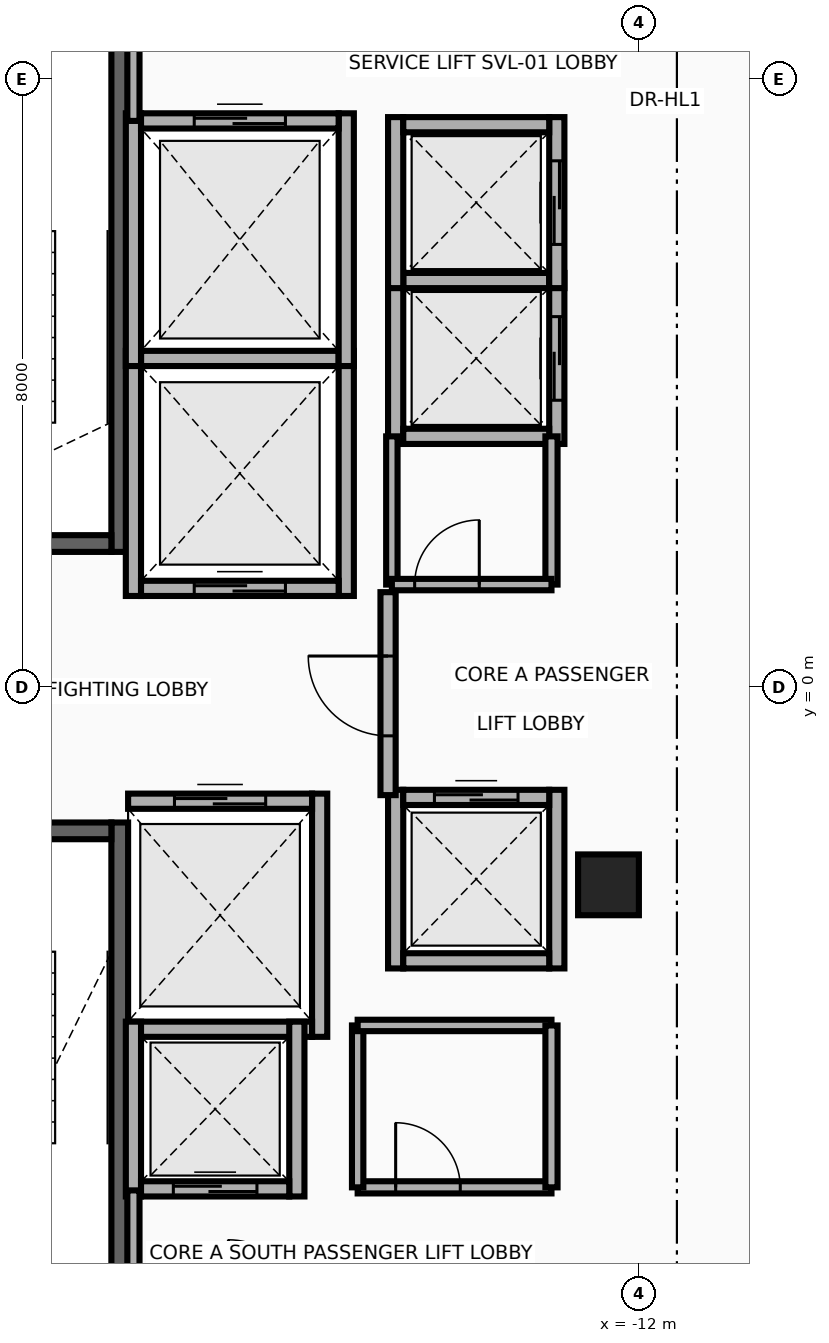
"""IFC4 building model, lengths in metres.
Left out: names, types, materials, properties, quantities, classifications, styles, units other than length and angle.
Written with IfcOpenShell. Run it as: python <this file> out.ifc"""

import sys

from ifc_helpers import new_model, si_unit, direction, frame, frame_2d, origin, origin_2d, place, context, subcontext, project, spatial, rectangle, extrude, source, transform, mapped, element, fill, save


model = new_model("IFC4")
c1 = context("Model", 3, precision=1e-05, world=origin(), true_north=direction((0.0, 1.0)))
c2 = subcontext(c1, "Body", "Model", "MODEL_VIEW")
j1 = project(units=[si_unit("LENGTHUNIT", "METRE"), si_unit("PLANEANGLEUNIT", "RADIAN")], contexts=[c1])
p1 = place(None, origin())
s1 = spatial("IfcSite", under=j1, at=p1, CompositionType="ELEMENT")
p2 = place(p1, origin())
s2 = spatial("IfcBuilding", under=s1, at=p2, CompositionType="ELEMENT")
p3 = place(p2, frame((0.0, 0.0, 276.5)))
s3 = spatial("IfcBuildingStorey", under=s2, at=p3, CompositionType="ELEMENT", Elevation=276.5)
p4 = place(p3, frame((-18.83, 1.78, 0.0), z_axis=(0.0, 0.0, 1.0), x_axis=(0.0, 1.0, 0.0)))
e1 = element("IfcWall", 1, at=p4, inside=s3, PredefinedType="SHEAR", context=c2, shape_type="SweptSolid", body=[
    extrude(rectangle(XDim=8.745, YDim=0.22, at=frame_2d((4.373, 0.0))), origin(), (0.0, 0.0, 1.0), 3.26),
])
p5 = place(p3, frame((-22.05, 1.89, 0.0), z_axis=(0.0, 0.0, 1.0), x_axis=(1.0, 0.0, 0.0)))
e2 = element("IfcWall", 2, at=p5, inside=s3, PredefinedType="SHEAR", context=c2, shape_type="SweptSolid", body=[
    extrude(rectangle(XDim=3.11, YDim=0.22, at=frame_2d((1.555, 0.0))), origin(), (0.0, 0.0, 1.0), 3.26),
])
p6 = place(p5, frame((1.0, 0.0, 0.0)))
e3 = element("IfcOpeningElement", 3, at=p6, cuts=e2, PredefinedType="OPENING", context=c2, shape_type="SweptSolid", body=[
    extrude(rectangle(XDim=1.1, YDim=2.15, at=frame_2d((0.55, 1.075))), frame((0.0, 0.125, 0.0), z_axis=(0.0, -1.0, 0.0), x_axis=(1.0, 0.0, 0.0)), (0.0, 0.0, 1.0), 0.25),
])
p7 = place(p3, frame((-18.83, -10.525, 0.0), z_axis=(0.0, 0.0, 1.0), x_axis=(0.0, 1.0, 0.0)))
e4 = element("IfcWall", 4, at=p7, inside=s3, PredefinedType="SHEAR", context=c2, shape_type="SweptSolid", body=[
    extrude(rectangle(XDim=8.745, YDim=0.22, at=frame_2d((4.373, 0.0))), origin(), (0.0, 0.0, 1.0), 3.26),
])
p8 = place(p3, frame((-22.05, -1.89, 0.0), z_axis=(0.0, 0.0, 1.0), x_axis=(1.0, 0.0, 0.0)))
e5 = element("IfcWall", 5, at=p8, inside=s3, PredefinedType="SHEAR", context=c2, shape_type="SweptSolid", body=[
    extrude(rectangle(XDim=3.11, YDim=0.22, at=frame_2d((1.555, 0.0))), origin(), (0.0, 0.0, 1.0), 3.26),
])
p9 = place(p8, frame((1.0, 0.0, 0.0)))
e6 = element("IfcOpeningElement", 6, at=p9, cuts=e5, PredefinedType="OPENING", context=c2, shape_type="SweptSolid", body=[
    extrude(rectangle(XDim=1.1, YDim=2.15, at=frame_2d((0.55, 1.075))), frame((0.0, 0.125, 0.0), z_axis=(0.0, -1.0, 0.0), x_axis=(1.0, 0.0, 0.0)), (0.0, 0.0, 1.0), 0.25),
])
m1 = source(origin(), c2, "Body", "SweptSolid", [
    extrude(rectangle(XDim=0.8, YDim=0.8, at=origin_2d()), origin(), (0.0, 0.0, 1.0), 3.5),
])
p10 = place(p3, frame((-12.4, -2.6, 0.0), z_axis=(0.0, 0.0, 1.0), x_axis=(1.0, 0.0, 0.0)))
e7 = element("IfcColumn", 7, at=p10, inside=s3, PredefinedType="COLUMN", context=c2, shape_type="MappedRepresentation", body=[
    mapped(m1, transform((0.0, 0.0, 0.0), x_axis=(1.0, 0.0, 0.0), y_axis=(0.0, 1.0, 0.0), z_axis=(0.0, 0.0, 1.0), scale=1.0)),
])
for number, where, z_axis, x_axis in (
    (8, (-18.65, 1.2, 0.0), (0.0, 0.0, 1.0), (0.0, 1.0, 0.0)),
    (9, (-15.85, 1.2, 0.0), (0.0, 0.0, 1.0), (0.0, 1.0, 0.0)),
):
    element("IfcWall", number, at=place(p3, frame(where, z_axis=z_axis, x_axis=x_axis)), inside=s3, PredefinedType="MOVABLE", context=c2, shape_type="SweptSolid", body=[
        extrude(rectangle(XDim=3.225, YDim=0.2, at=frame_2d((1.613, 0.0))), origin(), (0.0, 0.0, 1.0), 3.26),
    ])
p11 = place(p3, frame((-18.55, 1.3, 0.0), z_axis=(0.0, 0.0, 1.0), x_axis=(1.0, 0.0, 0.0)))
e10 = element("IfcWall", 10, at=p11, inside=s3, PredefinedType="MOVABLE", context=c2, shape_type="SweptSolid", body=[
    extrude(rectangle(XDim=2.6, YDim=0.2, at=frame_2d((1.3, 0.0))), origin(), (0.0, 0.0, 1.0), 3.26),
])
p12 = place(p11, frame((0.7, 0.0, 0.0)))
e11 = element("IfcOpeningElement", 11, at=p12, cuts=e10, PredefinedType="OPENING", context=c2, shape_type="SweptSolid", body=[
    extrude(rectangle(XDim=1.2, YDim=2.1, at=frame_2d((0.6, 1.05))), frame((0.0, 0.115, 0.0), z_axis=(0.0, -1.0, 0.0), x_axis=(1.0, 0.0, 0.0)), (0.0, 0.0, 1.0), 0.23),
])
p13 = place(p3, frame((-18.55, 4.325, 0.0), z_axis=(0.0, 0.0, 1.0), x_axis=(1.0, 0.0, 0.0)))
e12 = element("IfcWall", 12, at=p13, inside=s3, PredefinedType="MOVABLE", context=c2, shape_type="SweptSolid", body=[
    extrude(rectangle(XDim=2.6, YDim=0.2, at=frame_2d((1.3, 0.0))), origin(), (0.0, 0.0, 1.0), 3.26),
])
p14 = place(p3, frame((-16.2, -4.6, 0.0), z_axis=(0.0, 0.0, 1.0), x_axis=(0.0, 1.0, 0.0)))
e13 = element("IfcWall", 13, at=p14, inside=s3, PredefinedType="MOVABLE", context=c2, shape_type="SweptSolid", body=[
    extrude(rectangle(XDim=3.2, YDim=0.2, at=frame_2d((1.6, 0.0))), origin(), (0.0, 0.0, 1.0), 3.26),
])
p15 = place(p3, frame((-18.72, -4.5, 0.0), z_axis=(0.0, 0.0, 1.0), x_axis=(1.0, 0.0, 0.0)))
e14 = element("IfcWall", 14, at=p15, inside=s3, PredefinedType="MOVABLE", context=c2, shape_type="SweptSolid", body=[
    extrude(rectangle(XDim=2.42, YDim=0.2, at=frame_2d((1.21, 0.0))), origin(), (0.0, 0.0, 1.0), 3.26),
])
p16 = place(p3, frame((-18.72, -1.5, 0.0), z_axis=(0.0, 0.0, 1.0), x_axis=(1.0, 0.0, 0.0)))
e15 = element("IfcWall", 15, at=p16, inside=s3, PredefinedType="MOVABLE", context=c2, shape_type="SweptSolid", body=[
    extrude(rectangle(XDim=2.42, YDim=0.2, at=frame_2d((1.21, 0.0))), origin(), (0.0, 0.0, 1.0), 3.26),
])
p17 = place(p16, frame((0.61, 0.0, 0.0)))
e16 = element("IfcOpeningElement", 16, at=p17, cuts=e15, PredefinedType="OPENING", context=c2, shape_type="SweptSolid", body=[
    extrude(rectangle(XDim=1.2, YDim=2.1, at=frame_2d((0.6, 1.05))), frame((0.0, 0.115, 0.0), z_axis=(0.0, -1.0, 0.0), x_axis=(1.0, 0.0, 0.0)), (0.0, 0.0, 1.0), 0.23),
])
for number, where, z_axis, x_axis in (
    (17, (-18.65, 4.225, 0.0), (0.0, 0.0, 1.0), (0.0, 1.0, 0.0)),
    (18, (-15.85, 4.225, 0.0), (0.0, 0.0, 1.0), (0.0, 1.0, 0.0)),
):
    element("IfcWall", number, at=place(p3, frame(where, z_axis=z_axis, x_axis=x_axis)), inside=s3, PredefinedType="MOVABLE", context=c2, shape_type="SweptSolid", body=[
        extrude(rectangle(XDim=3.325, YDim=0.2, at=frame_2d((1.663, 0.0))), origin(), (0.0, 0.0, 1.0), 3.26),
    ])
p18 = place(p3, frame((-18.55, 7.45, 0.0), z_axis=(0.0, 0.0, 1.0), x_axis=(1.0, 0.0, 0.0)))
e19 = element("IfcWall", 19, at=p18, inside=s3, PredefinedType="MOVABLE", context=c2, shape_type="SweptSolid", body=[
    extrude(rectangle(XDim=2.6, YDim=0.2, at=frame_2d((1.3, 0.0))), origin(), (0.0, 0.0, 1.0), 3.26),
])
p19 = place(p18, frame((0.7, 0.0, 0.0)))
e20 = element("IfcOpeningElement", 20, at=p19, cuts=e19, PredefinedType="OPENING", context=c2, shape_type="SweptSolid", body=[
    extrude(rectangle(XDim=1.2, YDim=2.1, at=frame_2d((0.6, 1.05))), frame((0.0, 0.115, 0.0), z_axis=(0.0, -1.0, 0.0), x_axis=(1.0, 0.0, 0.0)), (0.0, 0.0, 1.0), 0.23),
])
p20 = place(p3, frame((-15.2, 3.2, 0.0), z_axis=(0.0, 0.0, 1.0), x_axis=(0.0, 1.0, 0.0)))
e21 = element("IfcWall", 21, at=p20, inside=s3, PredefinedType="MOVABLE", context=c2, shape_type="SweptSolid", body=[
    extrude(rectangle(XDim=2.25, YDim=0.2, at=frame_2d((1.125, 0.0))), origin(), (0.0, 0.0, 1.0), 3.26),
])
p21 = place(p3, frame((-13.08, 3.2, 0.0), z_axis=(0.0, 0.0, 1.0), x_axis=(0.0, 1.0, 0.0)))
e22 = element("IfcWall", 22, at=p21, inside=s3, PredefinedType="MOVABLE", context=c2, shape_type="SweptSolid", body=[
    extrude(rectangle(XDim=2.25, YDim=0.2, at=frame_2d((1.125, 0.0))), origin(), (0.0, 0.0, 1.0), 3.26),
])
p22 = place(p21, frame((0.575, 0.0, 0.0)))
e23 = element("IfcOpeningElement", 23, at=p22, cuts=e22, PredefinedType="OPENING", context=c2, shape_type="SweptSolid", body=[
    extrude(rectangle(XDim=1.1, YDim=2.1, at=frame_2d((0.55, 1.05))), frame((0.0, 0.115, 0.0), z_axis=(0.0, -1.0, 0.0), x_axis=(1.0, 0.0, 0.0)), (0.0, 0.0, 1.0), 0.23),
])
for number, where, z_axis, x_axis in (
    (24, (-15.1, 3.3, 0.0), (0.0, 0.0, 1.0), (1.0, 0.0, 0.0)),
    (25, (-15.1, 5.35, 0.0), (0.0, 0.0, 1.0), (1.0, 0.0, 0.0)),
):
    element("IfcWall", number, at=place(p3, frame(where, z_axis=z_axis, x_axis=x_axis)), inside=s3, PredefinedType="MOVABLE", context=c2, shape_type="SweptSolid", body=[
        extrude(rectangle(XDim=1.92, YDim=0.2, at=frame_2d((0.96, 0.0))), origin(), (0.0, 0.0, 1.0), 3.26),
    ])
p23 = place(p3, frame((-15.2, 5.25, 0.0), z_axis=(0.0, 0.0, 1.0), x_axis=(0.0, 1.0, 0.0)))
e26 = element("IfcWall", 26, at=p23, inside=s3, PredefinedType="MOVABLE", context=c2, shape_type="SweptSolid", body=[
    extrude(rectangle(XDim=2.25, YDim=0.2, at=frame_2d((1.125, 0.0))), origin(), (0.0, 0.0, 1.0), 3.26),
])
p24 = place(p3, frame((-13.08, 5.25, 0.0), z_axis=(0.0, 0.0, 1.0), x_axis=(0.0, 1.0, 0.0)))
e27 = element("IfcWall", 27, at=p24, inside=s3, PredefinedType="MOVABLE", context=c2, shape_type="SweptSolid", body=[
    extrude(rectangle(XDim=2.25, YDim=0.2, at=frame_2d((1.125, 0.0))), origin(), (0.0, 0.0, 1.0), 3.26),
])
p25 = place(p24, frame((0.575, 0.0, 0.0)))
e28 = element("IfcOpeningElement", 28, at=p25, cuts=e27, PredefinedType="OPENING", context=c2, shape_type="SweptSolid", body=[
    extrude(rectangle(XDim=1.1, YDim=2.1, at=frame_2d((0.55, 1.05))), frame((0.0, 0.115, 0.0), z_axis=(0.0, -1.0, 0.0), x_axis=(1.0, 0.0, 0.0)), (0.0, 0.0, 1.0), 0.23),
])
p26 = place(p3, frame((-15.1, 7.4, 0.0), z_axis=(0.0, 0.0, 1.0), x_axis=(1.0, 0.0, 0.0)))
e29 = element("IfcWall", 29, at=p26, inside=s3, PredefinedType="MOVABLE", context=c2, shape_type="SweptSolid", body=[
    extrude(rectangle(XDim=1.92, YDim=0.2, at=frame_2d((0.96, 0.0))), origin(), (0.0, 0.0, 1.0), 3.26),
])
for number, where, z_axis, x_axis in (
    (30, (-18.65, -6.7, 0.0), (0.0, 0.0, 1.0), (0.0, 1.0, 0.0)),
    (31, (-16.5, -6.7, 0.0), (0.0, 0.0, 1.0), (0.0, 1.0, 0.0)),
):
    element("IfcWall", number, at=place(p3, frame(where, z_axis=z_axis, x_axis=x_axis)), inside=s3, PredefinedType="MOVABLE", context=c2, shape_type="SweptSolid", body=[
        extrude(rectangle(XDim=2.3, YDim=0.2, at=frame_2d((1.15, 0.0))), origin(), (0.0, 0.0, 1.0), 3.26),
    ])
p27 = place(p3, frame((-18.55, -6.6, 0.0), z_axis=(0.0, 0.0, 1.0), x_axis=(1.0, 0.0, 0.0)))
e32 = element("IfcWall", 32, at=p27, inside=s3, PredefinedType="MOVABLE", context=c2, shape_type="SweptSolid", body=[
    extrude(rectangle(XDim=1.95, YDim=0.2, at=frame_2d((0.975, 0.0))), origin(), (0.0, 0.0, 1.0), 3.26),
])
p28 = place(p27, frame((0.425, 0.0, 0.0)))
e33 = element("IfcOpeningElement", 33, at=p28, cuts=e32, PredefinedType="OPENING", context=c2, shape_type="SweptSolid", body=[
    extrude(rectangle(XDim=1.1, YDim=2.1, at=frame_2d((0.55, 1.05))), frame((0.0, 0.115, 0.0), z_axis=(0.0, -1.0, 0.0), x_axis=(1.0, 0.0, 0.0)), (0.0, 0.0, 1.0), 0.23),
])
for number, where, z_axis, x_axis in (
    (34, (-15.2, -3.7, 0.0), (0.0, 0.0, 1.0), (0.0, 1.0, 0.0)),
    (35, (-13.08, -3.7, 0.0), (0.0, 0.0, 1.0), (0.0, 1.0, 0.0)),
):
    element("IfcWall", number, at=place(p3, frame(where, z_axis=z_axis, x_axis=x_axis)), inside=s3, PredefinedType="MOVABLE", context=c2, shape_type="SweptSolid", body=[
        extrude(rectangle(XDim=2.35, YDim=0.2, at=frame_2d((1.175, 0.0))), origin(), (0.0, 0.0, 1.0), 3.26),
    ])
p29 = place(p3, frame((-15.1, -3.6, 0.0), z_axis=(0.0, 0.0, 1.0), x_axis=(1.0, 0.0, 0.0)))
e36 = element("IfcWall", 36, at=p29, inside=s3, PredefinedType="MOVABLE", context=c2, shape_type="SweptSolid", body=[
    extrude(rectangle(XDim=1.92, YDim=0.2, at=frame_2d((0.96, 0.0))), origin(), (0.0, 0.0, 1.0), 3.26),
])
p30 = place(p3, frame((-15.1, -1.45, 0.0), z_axis=(0.0, 0.0, 1.0), x_axis=(1.0, 0.0, 0.0)))
e37 = element("IfcWall", 37, at=p30, inside=s3, PredefinedType="MOVABLE", context=c2, shape_type="SweptSolid", body=[
    extrude(rectangle(XDim=1.92, YDim=0.2, at=frame_2d((0.96, 0.0))), origin(), (0.0, 0.0, 1.0), 3.26),
])
p31 = place(p30, frame((0.41, 0.0, 0.0)))
e38 = element("IfcOpeningElement", 38, at=p31, cuts=e37, PredefinedType="OPENING", context=c2, shape_type="SweptSolid", body=[
    extrude(rectangle(XDim=1.1, YDim=2.1, at=frame_2d((0.55, 1.05))), frame((0.0, 0.115, 0.0), z_axis=(0.0, -1.0, 0.0), x_axis=(1.0, 0.0, 0.0)), (0.0, 0.0, 1.0), 0.23),
])
p32 = place(p3, frame((-15.3, -1.42, 0.0), z_axis=(0.0, 0.0, 1.0), x_axis=(0.0, 1.0, 0.0)))
e39 = element("IfcWall", 39, at=p32, inside=s3, PredefinedType="PARTITIONING", context=c2, shape_type="SweptSolid", body=[
    extrude(rectangle(XDim=2.67, YDim=0.2, at=frame_2d((1.335, 0.0))), origin(), (0.0, 0.0, 1.0), 3.26),
])
p33 = place(p32, frame((0.78, 0.0, 0.0)))
e40 = element("IfcOpeningElement", 40, at=p33, cuts=e39, PredefinedType="OPENING", context=c2, shape_type="SweptSolid", body=[
    extrude(rectangle(XDim=1.05, YDim=2.15, at=frame_2d((0.525, 1.075))), frame((0.0, 0.115, 0.0), z_axis=(0.0, -1.0, 0.0), x_axis=(1.0, 0.0, 0.0)), (0.0, 0.0, 1.0), 0.23),
])
p34 = place(p3, frame((-18.65, 7.45, 0.0), z_axis=(0.0, 0.0, 1.0), x_axis=(0.0, 1.0, 0.0)))
e41 = element("IfcWall", 41, at=p34, inside=s3, PredefinedType="PARTITIONING", context=c2, shape_type="SweptSolid", body=[
    extrude(rectangle(XDim=2.93, YDim=0.16, at=frame_2d((1.465, 0.0))), origin(), (0.0, 0.0, 1.0), 3.26),
])
p35 = place(p3, frame((-18.65, -8.18, 0.0), z_axis=(0.0, 0.0, 1.0), x_axis=(0.0, 1.0, 0.0)))
e42 = element("IfcWall", 42, at=p35, inside=s3, PredefinedType="PARTITIONING", context=c2, shape_type="SweptSolid", body=[
    extrude(rectangle(XDim=1.56, YDim=0.16, at=frame_2d((0.78, 0.0))), origin(), (0.0, 0.0, 1.0), 3.26),
])
p36 = place(p3, frame((-15.7, -6.58, 0.0), z_axis=(0.0, 0.0, 1.0), x_axis=(1.0, 0.0, 0.0)))
e43 = element("IfcWall", 43, at=p36, inside=s3, PredefinedType="PARTITIONING", context=c2, shape_type="SweptSolid", body=[
    extrude(rectangle(XDim=2.55, YDim=0.16, at=frame_2d((1.275, 0.0))), origin(), (0.0, 0.0, 1.0), 3.26),
])
p37 = place(p36, frame((0.5, 0.0, 0.0)))
e44 = element("IfcOpeningElement", 44, at=p37, cuts=e43, PredefinedType="OPENING", context=c2, shape_type="SweptSolid", body=[
    extrude(rectangle(XDim=0.85, YDim=2.05, at=frame_2d((0.425, 1.025))), frame((0.0, 0.095, 0.0), z_axis=(0.0, -1.0, 0.0), x_axis=(1.0, 0.0, 0.0)), (0.0, 0.0, 1.0), 0.19),
])
p38 = place(p3, frame((-15.7, -6.58, 0.0), z_axis=(0.0, 0.0, 1.0), x_axis=(0.0, 1.0, 0.0)))
e45 = element("IfcWall", 45, at=p38, inside=s3, PredefinedType="PARTITIONING", context=c2, shape_type="SweptSolid", body=[
    extrude(rectangle(XDim=2.13, YDim=0.15, at=frame_2d((1.065, 0.0))), origin(), (0.0, 0.0, 1.0), 3.26),
])
p39 = place(p3, frame((-15.7, -4.45, 0.0), z_axis=(0.0, 0.0, 1.0), x_axis=(1.0, 0.0, 0.0)))
e46 = element("IfcWall", 46, at=p39, inside=s3, PredefinedType="PARTITIONING", context=c2, shape_type="SweptSolid", body=[
    extrude(rectangle(XDim=2.55, YDim=0.15, at=frame_2d((1.275, 0.0))), origin(), (0.0, 0.0, 1.0), 3.26),
])
p40 = place(p3, frame((-13.15, -6.58, 0.0), z_axis=(0.0, 0.0, 1.0), x_axis=(0.0, 1.0, 0.0)))
e47 = element("IfcWall", 47, at=p40, inside=s3, PredefinedType="PARTITIONING", context=c2, shape_type="SweptSolid", body=[
    extrude(rectangle(XDim=2.13, YDim=0.16, at=frame_2d((1.065, 0.0))), origin(), (0.0, 0.0, 1.0), 3.26),
])
p41 = place(p3, frame((-13.15, 1.35, 0.0), z_axis=(0.0, 0.0, 1.0), x_axis=(0.0, 1.0, 0.0)))
e48 = element("IfcWall", 48, at=p41, inside=s3, PredefinedType="PARTITIONING", context=c2, shape_type="SweptSolid", body=[
    extrude(rectangle(XDim=1.95, YDim=0.16, at=frame_2d((0.975, 0.0))), origin(), (0.0, 0.0, 1.0), 3.26),
])
p42 = place(p3, frame((-15.25, 1.35, 0.0), z_axis=(0.0, 0.0, 1.0), x_axis=(0.0, 1.0, 0.0)))
e49 = element("IfcWall", 49, at=p42, inside=s3, PredefinedType="PARTITIONING", context=c2, shape_type="SweptSolid", body=[
    extrude(rectangle(XDim=1.95, YDim=0.15, at=frame_2d((0.975, 0.0))), origin(), (0.0, 0.0, 1.0), 3.26),
])
p43 = place(p3, frame((-15.25, 1.35, 0.0), z_axis=(0.0, 0.0, 1.0), x_axis=(1.0, 0.0, 0.0)))
e50 = element("IfcWall", 50, at=p43, inside=s3, PredefinedType="PARTITIONING", context=c2, shape_type="SweptSolid", body=[
    extrude(rectangle(XDim=2.1, YDim=0.15, at=frame_2d((1.05, 0.0))), origin(), (0.0, 0.0, 1.0), 3.26),
])
p44 = place(p43, frame((0.3, 0.0, 0.0)))
e51 = element("IfcOpeningElement", 51, at=p44, cuts=e50, PredefinedType="OPENING", context=c2, shape_type="SweptSolid", body=[
    extrude(rectangle(XDim=0.85, YDim=2.05, at=frame_2d((0.425, 1.025))), frame((0.0, 0.09, 0.0), z_axis=(0.0, -1.0, 0.0), x_axis=(1.0, 0.0, 0.0)), (0.0, 0.0, 1.0), 0.18),
])
p45 = place(p12, origin())
e52 = element("IfcDoor", 52, at=p45, inside=s3, OperationType="DOUBLE_DOOR_SLIDING", PredefinedType="DOOR", context=c2, shape_type="SweptSolid", body=[
    extrude(rectangle(XDim=1.2, YDim=2.1, at=frame_2d((0.6, 1.05))), frame((0.0, 0.025, 0.0), z_axis=(0.0, -1.0, 0.0), x_axis=(1.0, 0.0, 0.0)), (0.0, 0.0, 1.0), 0.05),
])
fill(e11, e52)
p46 = place(p17, origin())
e53 = element("IfcDoor", 53, at=p46, inside=s3, OperationType="DOUBLE_DOOR_SLIDING", PredefinedType="DOOR", context=c2, shape_type="SweptSolid", body=[
    extrude(rectangle(XDim=1.2, YDim=2.1, at=frame_2d((0.6, 1.05))), frame((0.0, 0.025, 0.0), z_axis=(0.0, -1.0, 0.0), x_axis=(1.0, 0.0, 0.0)), (0.0, 0.0, 1.0), 0.05),
])
fill(e16, e53)
p47 = place(p19, origin())
e54 = element("IfcDoor", 54, at=p47, inside=s3, OperationType="DOUBLE_DOOR_SLIDING", PredefinedType="DOOR", context=c2, shape_type="SweptSolid", body=[
    extrude(rectangle(XDim=1.2, YDim=2.1, at=frame_2d((0.6, 1.05))), frame((0.0, 0.025, 0.0), z_axis=(0.0, -1.0, 0.0), x_axis=(1.0, 0.0, 0.0)), (0.0, 0.0, 1.0), 0.05),
])
fill(e20, e54)
p48 = place(p22, origin())
e55 = element("IfcDoor", 55, at=p48, inside=s3, OperationType="DOUBLE_DOOR_SLIDING", PredefinedType="DOOR", context=c2, shape_type="SweptSolid", body=[
    extrude(rectangle(XDim=1.1, YDim=2.1, at=frame_2d((0.55, 1.05))), frame((0.0, 0.025, 0.0), z_axis=(0.0, -1.0, 0.0), x_axis=(1.0, 0.0, 0.0)), (0.0, 0.0, 1.0), 0.05),
])
fill(e23, e55)
p49 = place(p25, origin())
e56 = element("IfcDoor", 56, at=p49, inside=s3, OperationType="DOUBLE_DOOR_SLIDING", PredefinedType="DOOR", context=c2, shape_type="SweptSolid", body=[
    extrude(rectangle(XDim=1.1, YDim=2.1, at=frame_2d((0.55, 1.05))), frame((0.0, 0.025, 0.0), z_axis=(0.0, -1.0, 0.0), x_axis=(1.0, 0.0, 0.0)), (0.0, 0.0, 1.0), 0.05),
])
fill(e28, e56)
p50 = place(p28, origin())
e57 = element("IfcDoor", 57, at=p50, inside=s3, OperationType="DOUBLE_DOOR_SLIDING", PredefinedType="DOOR", context=c2, shape_type="SweptSolid", body=[
    extrude(rectangle(XDim=1.1, YDim=2.1, at=frame_2d((0.55, 1.05))), frame((0.0, 0.025, 0.0), z_axis=(0.0, -1.0, 0.0), x_axis=(1.0, 0.0, 0.0)), (0.0, 0.0, 1.0), 0.05),
])
fill(e33, e57)
p51 = place(p31, origin())
e58 = element("IfcDoor", 58, at=p51, inside=s3, OperationType="DOUBLE_DOOR_SLIDING", PredefinedType="DOOR", context=c2, shape_type="SweptSolid", body=[
    extrude(rectangle(XDim=1.1, YDim=2.1, at=frame_2d((0.55, 1.05))), frame((0.0, 0.025, 0.0), z_axis=(0.0, -1.0, 0.0), x_axis=(1.0, 0.0, 0.0)), (0.0, 0.0, 1.0), 0.05),
])
fill(e38, e58)
p52 = place(p33, origin())
e59 = element("IfcDoor", 59, at=p52, inside=s3, OperationType="SINGLE_SWING_RIGHT", PredefinedType="DOOR", context=c2, shape_type="SweptSolid", body=[
    extrude(rectangle(XDim=1.05, YDim=2.15, at=frame_2d((0.525, 1.075))), frame((0.0, 0.025, 0.0), z_axis=(0.0, -1.0, 0.0), x_axis=(1.0, 0.0, 0.0)), (0.0, 0.0, 1.0), 0.05),
])
fill(e40, e59)
p53 = place(p37, origin())
e60 = element("IfcDoor", 60, at=p53, inside=s3, OperationType="SINGLE_SWING_RIGHT", PredefinedType="DOOR", context=c2, shape_type="SweptSolid", body=[
    extrude(rectangle(XDim=0.85, YDim=2.05, at=frame_2d((0.425, 1.025))), frame((0.0, 0.025, 0.0), z_axis=(0.0, -1.0, 0.0), x_axis=(1.0, 0.0, 0.0)), (0.0, 0.0, 1.0), 0.05),
])
fill(e44, e60)
p54 = place(p44, origin())
e61 = element("IfcDoor", 61, at=p54, inside=s3, OperationType="SINGLE_SWING_LEFT", PredefinedType="DOOR", context=c2, shape_type="SweptSolid", body=[
    extrude(rectangle(XDim=0.85, YDim=2.05, at=frame_2d((0.425, 1.025))), frame((0.0, 0.025, 0.0), z_axis=(0.0, -1.0, 0.0), x_axis=(1.0, 0.0, 0.0)), (0.0, 0.0, 1.0), 0.05),
])
fill(e51, e61)
save(model, sys.argv[1])
